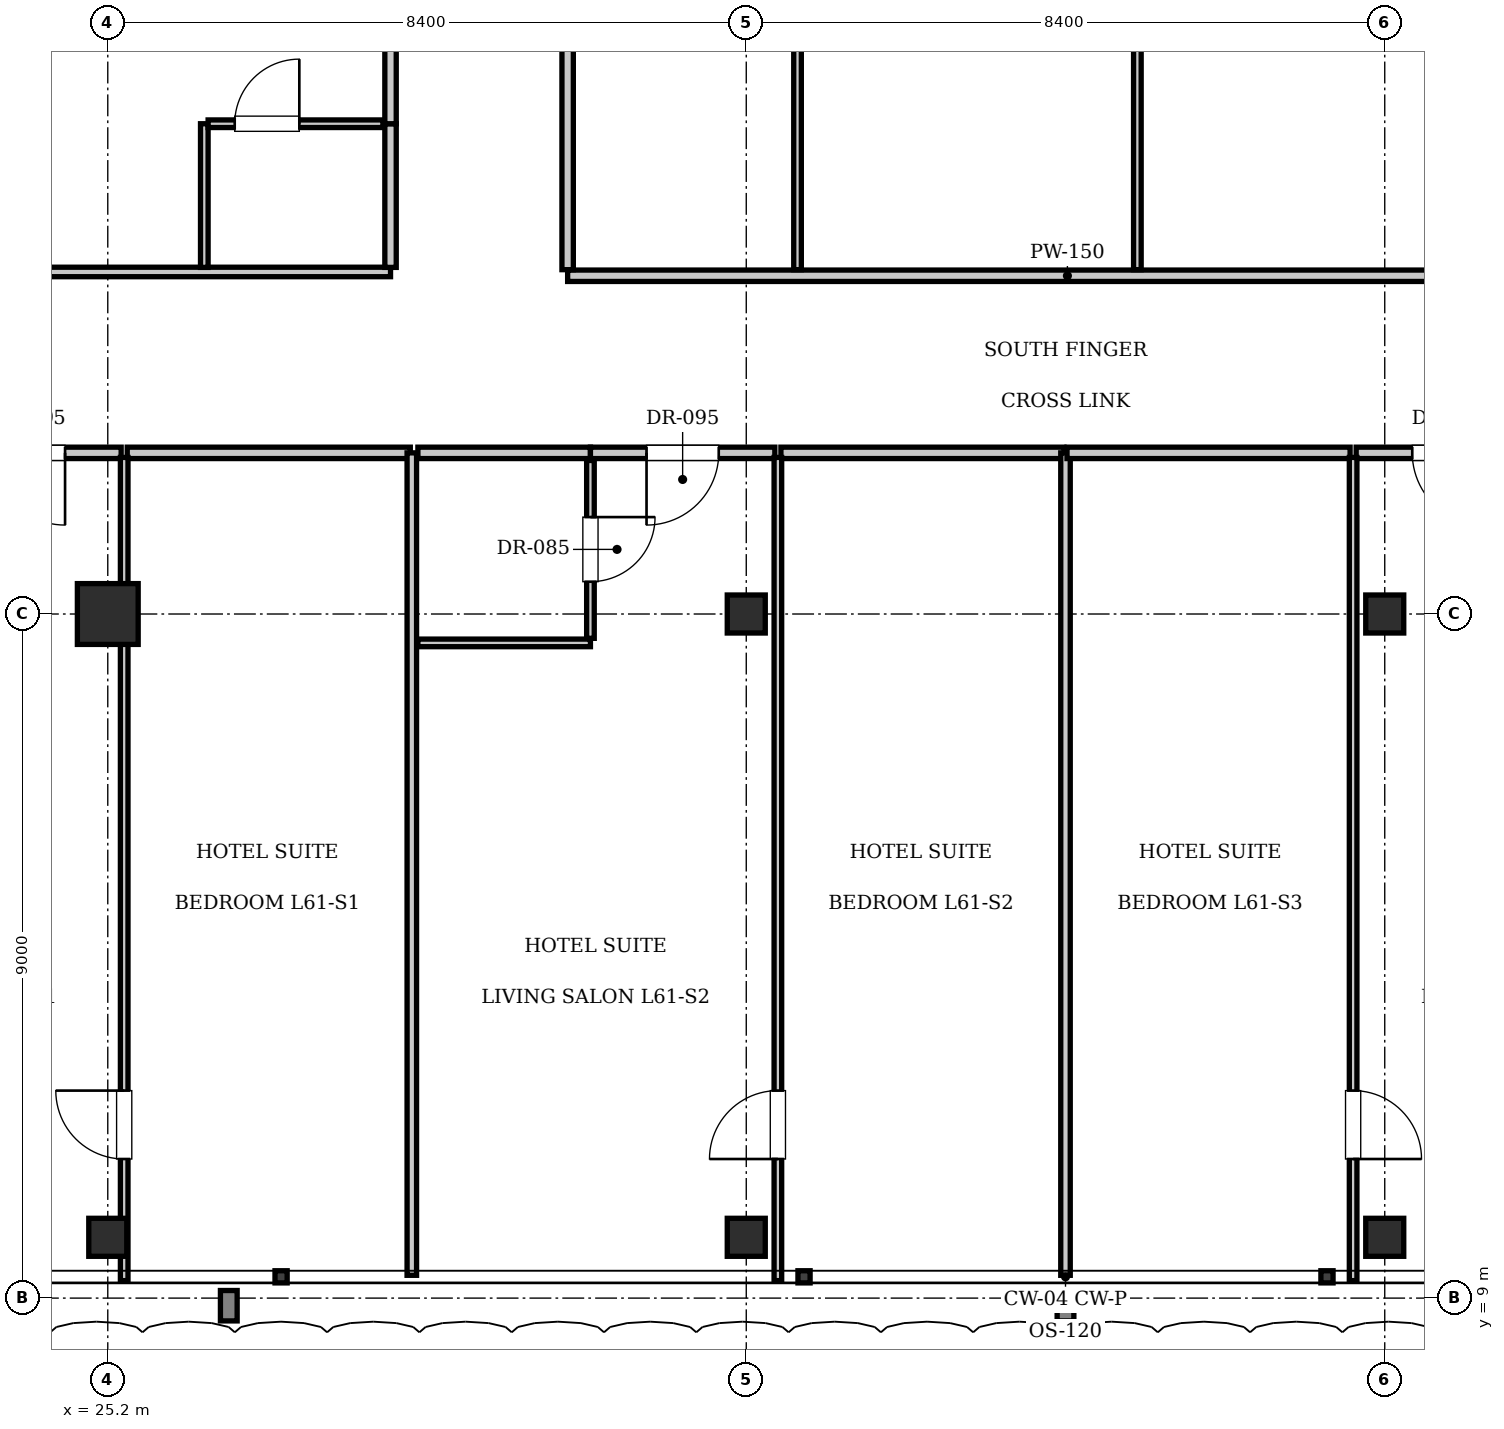
"""IFC4 building model, lengths in metres.
Left out: names, types, materials, properties, quantities, classifications, styles, units other than length and angle.
Written with IfcOpenShell. Run it as: python <this file> out.ifc"""

import sys

from ifc_helpers import new_model, si_unit, direction, frame, frame_2d, origin, origin_2d, place, context, subcontext, project, spatial, rectangle, i_section, extrude, element, fill, save


model = new_model("IFC4")
c1 = context("Model", 3, precision=1e-05, world=origin(), true_north=direction((0.0, 1.0)))
c2 = subcontext(c1, "Body", "Model", "MODEL_VIEW")
j1 = project(units=[si_unit("LENGTHUNIT", "METRE"), si_unit("PLANEANGLEUNIT", "RADIAN")], contexts=[c1])
p1 = place(None, origin())
s1 = spatial("IfcSite", under=j1, at=p1, CompositionType="ELEMENT")
p2 = place(p1, origin())
s2 = spatial("IfcBuilding", under=s1, at=p2, CompositionType="ELEMENT")
p3 = place(p2, frame((0.0, 0.0, 250.95)))
s3 = spatial("IfcBuildingStorey", under=s2, at=p3, CompositionType="ELEMENT", Elevation=250.95)
p4 = place(p3, frame((25.2, 18.0, 0.0), z_axis=(0.0, 0.0, 1.0), x_axis=(1.0, 0.0, 0.0)))
e1 = element("IfcColumn", 1, at=p4, inside=s3, PredefinedType="COLUMN", context=c2, shape_type="SweptSolid", body=[
    extrude(rectangle(XDim=0.8, YDim=0.8, at=origin_2d()), origin(), (0.0, 0.0, 1.0), 3.85),
])
for number, where, z_axis, x_axis in (
    (2, (33.6, 18.0, 0.0), (0.0, 0.0, 1.0), (1.0, 0.0, 0.0)),
    (3, (42.0, 18.0, 0.0), (0.0, 0.0, 1.0), (1.0, 0.0, 0.0)),
    (4, (25.2, 9.8, 0.0), (0.0, 0.0, 1.0), (1.0, 0.0, 0.0)),
    (5, (33.6, 9.8, 0.0), (0.0, 0.0, 1.0), (1.0, 0.0, 0.0)),
    (6, (42.0, 9.8, 0.0), (0.0, 0.0, 1.0), (1.0, 0.0, 0.0)),
):
    element("IfcColumn", number, at=place(p3, frame(where, z_axis=z_axis, x_axis=x_axis)), inside=s3, PredefinedType="COLUMN", context=c2, shape_type="SweptSolid", body=[
        extrude(i_section(OverallWidth=0.5, OverallDepth=0.5, WebThickness=0.022, FlangeThickness=0.032, at=origin_2d()), origin(), (0.0, 0.0, 1.0), 3.85),
    ])
p5 = place(p3, frame((31.25, 22.45, 0.0), z_axis=(0.0, 0.0, 1.0), x_axis=(1.0, 0.0, 0.0)))
e7 = element("IfcWall", 7, at=p5, inside=s3, PredefinedType="PARTITIONING", context=c2, shape_type="SweptSolid", body=[
    extrude(rectangle(XDim=13.15, YDim=0.15, at=frame_2d((6.575, 0.0))), origin(), (0.0, 0.0, 1.0), 3.61),
])
p6 = place(p3, frame((31.25, 22.53, 0.0), z_axis=(0.0, 0.0, 1.0), x_axis=(0.0, 1.0, 0.0)))
e8 = element("IfcWall", 8, at=p6, inside=s3, PredefinedType="PARTITIONING", context=c2, shape_type="SweptSolid", body=[
    extrude(rectangle(XDim=8.89, YDim=0.15, at=frame_2d((4.445, 0.0))), origin(), (0.0, 0.0, 1.0), 3.61),
])
for number, where, z_axis, x_axis in (
    (9, (34.274, 22.53, 0.0), (0.0, 0.0, 1.0), (0.0, 1.0, 0.0)),
    (10, (38.746, 22.53, 0.0), (0.0, 0.0, 1.0), (0.0, 1.0, 0.0)),
):
    element("IfcWall", number, at=place(p3, frame(where, z_axis=z_axis, x_axis=x_axis)), inside=s3, PredefinedType="PARTITIONING", context=c2, shape_type="SweptSolid", body=[
        extrude(rectangle(XDim=8.89, YDim=0.1, at=frame_2d((4.445, 0.0))), origin(), (0.0, 0.0, 1.0), 3.61),
    ])
p7 = place(p3, frame((22.95, 20.12, 0.0), z_axis=(0.0, 0.0, 1.0), x_axis=(1.0, 0.0, 0.0)))
e11 = element("IfcWall", 11, at=p7, inside=s3, PredefinedType="PARTITIONING", context=c2, shape_type="SweptSolid", body=[
    extrude(rectangle(XDim=2.426, YDim=0.15, at=frame_2d((1.213, 0.0))), origin(), (0.0, 0.0, 1.0), 3.61),
])
p8 = place(p7, frame((0.738, 0.0, 0.0)))
e12 = element("IfcOpeningElement", 12, at=p8, cuts=e11, PredefinedType="OPENING", context=c2, shape_type="SweptSolid", body=[
    extrude(rectangle(XDim=0.95, YDim=2.15, at=frame_2d((0.475, 1.075))), frame((0.0, 0.085, 0.0), z_axis=(0.0, -1.0, 0.0), x_axis=(1.0, 0.0, 0.0)), (0.0, 0.0, 1.0), 0.17),
])
p9 = place(p3, frame((25.456, 20.12, 0.0), z_axis=(0.0, 0.0, 1.0), x_axis=(1.0, 0.0, 0.0)))
e13 = element("IfcWall", 13, at=p9, inside=s3, PredefinedType="PARTITIONING", context=c2, shape_type="SweptSolid", body=[
    extrude(rectangle(XDim=3.724, YDim=0.15, at=frame_2d((1.862, 0.0))), origin(), (0.0, 0.0, 1.0), 3.61),
])
p10 = place(p3, frame((25.416, 9.23, 0.0), z_axis=(0.0, 0.0, 1.0), x_axis=(0.0, 1.0, 0.0)))
e14 = element("IfcWall", 14, at=p10, inside=s3, PredefinedType="PARTITIONING", context=c2, shape_type="SweptSolid", body=[
    extrude(rectangle(XDim=10.83, YDim=0.1, at=frame_2d((5.415, 0.0))), origin(), (0.0, 0.0, 1.0), 3.61),
])
p11 = place(p10, frame((1.6, 0.0, 0.0)))
e15 = element("IfcOpeningElement", 15, at=p11, cuts=e14, PredefinedType="OPENING", context=c2, shape_type="SweptSolid", body=[
    extrude(rectangle(XDim=0.9, YDim=2.1, at=frame_2d((0.45, 1.05))), frame((0.0, 0.06, 0.0), z_axis=(0.0, -1.0, 0.0), x_axis=(1.0, 0.0, 0.0)), (0.0, 0.0, 1.0), 0.12),
])
p12 = place(p3, frame((29.2, 9.3, 0.0), z_axis=(0.0, 0.0, 1.0), x_axis=(0.0, 1.0, 0.0)))
e16 = element("IfcWall", 16, at=p12, inside=s3, PredefinedType="PARTITIONING", context=c2, shape_type="SweptSolid", body=[
    extrude(rectangle(XDim=10.82, YDim=0.125, at=frame_2d((5.41, 0.0))), origin(), (0.0, 0.0, 1.0), 3.61),
])
p13 = place(p3, frame((29.28, 20.12, 0.0), z_axis=(0.0, 0.0, 1.0), x_axis=(1.0, 0.0, 0.0)))
e17 = element("IfcWall", 17, at=p13, inside=s3, PredefinedType="PARTITIONING", context=c2, shape_type="SweptSolid", body=[
    extrude(rectangle(XDim=2.27, YDim=0.15, at=frame_2d((1.135, 0.0))), origin(), (0.0, 0.0, 1.0), 3.61),
])
p14 = place(p3, frame((29.28, 17.62, 0.0), z_axis=(0.0, 0.0, 1.0), x_axis=(1.0, 0.0, 0.0)))
e18 = element("IfcWall", 18, at=p14, inside=s3, PredefinedType="PARTITIONING", context=c2, shape_type="SweptSolid", body=[
    extrude(rectangle(XDim=2.27, YDim=0.1, at=frame_2d((1.135, 0.0))), origin(), (0.0, 0.0, 1.0), 3.61),
])
p15 = place(p3, frame((31.55, 17.68, 0.0), z_axis=(0.0, 0.0, 1.0), x_axis=(0.0, 1.0, 0.0)))
e19 = element("IfcWall", 19, at=p15, inside=s3, PredefinedType="PARTITIONING", context=c2, shape_type="SweptSolid", body=[
    extrude(rectangle(XDim=2.34, YDim=0.1, at=frame_2d((1.17, 0.0))), origin(), (0.0, 0.0, 1.0), 3.61),
])
p16 = place(p15, frame((0.745, 0.0, 0.0)))
e20 = element("IfcOpeningElement", 20, at=p16, cuts=e19, PredefinedType="OPENING", context=c2, shape_type="SweptSolid", body=[
    extrude(rectangle(XDim=0.85, YDim=2.1, at=frame_2d((0.425, 1.05))), frame((0.0, 0.06, 0.0), z_axis=(0.0, -1.0, 0.0), x_axis=(1.0, 0.0, 0.0)), (0.0, 0.0, 1.0), 0.12),
])
p17 = place(p3, frame((31.55, 20.12, 0.0), z_axis=(0.0, 0.0, 1.0), x_axis=(1.0, 0.0, 0.0)))
e21 = element("IfcWall", 21, at=p17, inside=s3, PredefinedType="PARTITIONING", context=c2, shape_type="SweptSolid", body=[
    extrude(rectangle(XDim=2.426, YDim=0.15, at=frame_2d((1.213, 0.0))), origin(), (0.0, 0.0, 1.0), 3.61),
])
p18 = place(p17, frame((0.738, 0.0, 0.0)))
e22 = element("IfcOpeningElement", 22, at=p18, cuts=e21, PredefinedType="OPENING", context=c2, shape_type="SweptSolid", body=[
    extrude(rectangle(XDim=0.95, YDim=2.15, at=frame_2d((0.475, 1.075))), frame((0.0, 0.085, 0.0), z_axis=(0.0, -1.0, 0.0), x_axis=(1.0, 0.0, 0.0)), (0.0, 0.0, 1.0), 0.17),
])
p19 = place(p3, frame((34.056, 20.12, 0.0), z_axis=(0.0, 0.0, 1.0), x_axis=(1.0, 0.0, 0.0)))
e23 = element("IfcWall", 23, at=p19, inside=s3, PredefinedType="PARTITIONING", context=c2, shape_type="SweptSolid", body=[
    extrude(rectangle(XDim=3.724, YDim=0.15, at=frame_2d((1.862, 0.0))), origin(), (0.0, 0.0, 1.0), 3.61),
])
p20 = place(p3, frame((34.016, 9.23, 0.0), z_axis=(0.0, 0.0, 1.0), x_axis=(0.0, 1.0, 0.0)))
e24 = element("IfcWall", 24, at=p20, inside=s3, PredefinedType="PARTITIONING", context=c2, shape_type="SweptSolid", body=[
    extrude(rectangle(XDim=10.83, YDim=0.1, at=frame_2d((5.415, 0.0))), origin(), (0.0, 0.0, 1.0), 3.61),
])
p21 = place(p20, frame((1.6, 0.0, 0.0)))
e25 = element("IfcOpeningElement", 25, at=p21, cuts=e24, PredefinedType="OPENING", context=c2, shape_type="SweptSolid", body=[
    extrude(rectangle(XDim=0.9, YDim=2.1, at=frame_2d((0.45, 1.05))), frame((0.0, 0.06, 0.0), z_axis=(0.0, -1.0, 0.0), x_axis=(1.0, 0.0, 0.0)), (0.0, 0.0, 1.0), 0.12),
])
p22 = place(p3, frame((37.8, 9.3, 0.0), z_axis=(0.0, 0.0, 1.0), x_axis=(0.0, 1.0, 0.0)))
e26 = element("IfcWall", 26, at=p22, inside=s3, PredefinedType="PARTITIONING", context=c2, shape_type="SweptSolid", body=[
    extrude(rectangle(XDim=10.82, YDim=0.125, at=frame_2d((5.41, 0.0))), origin(), (0.0, 0.0, 1.0), 3.352),
])
p23 = place(p3, frame((37.82, 20.12, 0.0), z_axis=(0.0, 0.0, 1.0), x_axis=(1.0, 0.0, 0.0)))
e27 = element("IfcWall", 27, at=p23, inside=s3, PredefinedType="PARTITIONING", context=c2, shape_type="SweptSolid", body=[
    extrude(rectangle(XDim=3.724, YDim=0.15, at=frame_2d((1.862, 0.0))), origin(), (0.0, 0.0, 1.0), 3.61),
])
p24 = place(p3, frame((41.624, 20.12, 0.0), z_axis=(0.0, 0.0, 1.0), x_axis=(1.0, 0.0, 0.0)))
e28 = element("IfcWall", 28, at=p24, inside=s3, PredefinedType="PARTITIONING", context=c2, shape_type="SweptSolid", body=[
    extrude(rectangle(XDim=2.426, YDim=0.15, at=frame_2d((1.213, 0.0))), origin(), (0.0, 0.0, 1.0), 3.61),
])
p25 = place(p24, frame((0.738, 0.0, 0.0)))
e29 = element("IfcOpeningElement", 29, at=p25, cuts=e28, PredefinedType="OPENING", context=c2, shape_type="SweptSolid", body=[
    extrude(rectangle(XDim=0.95, YDim=2.15, at=frame_2d((0.475, 1.075))), frame((0.0, 0.085, 0.0), z_axis=(0.0, -1.0, 0.0), x_axis=(1.0, 0.0, 0.0)), (0.0, 0.0, 1.0), 0.17),
])
p26 = place(p3, frame((41.584, 9.23, 0.0), z_axis=(0.0, 0.0, 1.0), x_axis=(0.0, 1.0, 0.0)))
e30 = element("IfcWall", 30, at=p26, inside=s3, PredefinedType="PARTITIONING", context=c2, shape_type="SweptSolid", body=[
    extrude(rectangle(XDim=10.83, YDim=0.1, at=frame_2d((5.415, 0.0))), origin(), (0.0, 0.0, 1.0), 3.61),
])
p27 = place(p26, frame((1.6, 0.0, 0.0)))
e31 = element("IfcOpeningElement", 31, at=p27, cuts=e30, PredefinedType="OPENING", context=c2, shape_type="SweptSolid", body=[
    extrude(rectangle(XDim=0.9, YDim=2.1, at=frame_2d((0.45, 1.05))), frame((0.0, 0.06, 0.0), z_axis=(0.0, -1.0, 0.0), x_axis=(1.0, 0.0, 0.0)), (0.0, 0.0, 1.0), 0.12),
])
p28 = place(p3, frame((15.5, 22.5, 0.0), z_axis=(0.0, 0.0, 1.0), x_axis=(1.0, 0.0, 0.0)))
e32 = element("IfcWall", 32, at=p28, inside=s3, PredefinedType="PARTITIONING", context=c2, shape_type="SweptSolid", body=[
    extrude(rectangle(XDim=13.42, YDim=0.125, at=frame_2d((6.71, 0.0))), origin(), (0.0, 0.0, 1.0), 3.61),
])
p29 = place(p3, frame((28.92, 22.56, 0.0), z_axis=(0.0, 0.0, 1.0), x_axis=(0.0, 1.0, 0.0)))
e33 = element("IfcWall", 33, at=p29, inside=s3, PredefinedType="PARTITIONING", context=c2, shape_type="SweptSolid", body=[
    extrude(rectangle(XDim=1.89, YDim=0.15, at=frame_2d((0.945, 0.0))), origin(), (0.0, 0.0, 1.0), 3.61),
])
p30 = place(p3, frame((28.92, 24.45, 0.0), z_axis=(0.0, 0.0, 1.0), x_axis=(0.0, 1.0, 0.0)))
e34 = element("IfcWall", 34, at=p30, inside=s3, PredefinedType="PARTITIONING", context=c2, shape_type="SweptSolid", body=[
    extrude(rectangle(XDim=2.93, YDim=0.15, at=frame_2d((1.465, 0.0))), origin(), (0.0, 0.0, 1.0), 3.61),
])
p31 = place(p30, frame((0.99, 0.0, 0.0)))
e35 = element("IfcOpeningElement", 35, at=p31, cuts=e34, PredefinedType="OPENING", context=c2, shape_type="SweptSolid", body=[
    extrude(rectangle(XDim=0.95, YDim=2.15, at=frame_2d((0.475, 1.075))), frame((0.0, 0.085, 0.0), z_axis=(0.0, -1.0, 0.0), x_axis=(1.0, 0.0, 0.0)), (0.0, 0.0, 1.0), 0.17),
])
p32 = place(p3, frame((26.47, 22.56, 0.0), z_axis=(0.0, 0.0, 1.0), x_axis=(0.0, 1.0, 0.0)))
e36 = element("IfcWall", 36, at=p32, inside=s3, PredefinedType="PARTITIONING", context=c2, shape_type="SweptSolid", body=[
    extrude(rectangle(XDim=1.89, YDim=0.1, at=frame_2d((0.945, 0.0))), origin(), (0.0, 0.0, 1.0), 3.61),
])
p33 = place(p3, frame((26.52, 24.45, 0.0), z_axis=(0.0, 0.0, 1.0), x_axis=(1.0, 0.0, 0.0)))
e37 = element("IfcWall", 37, at=p33, inside=s3, PredefinedType="PARTITIONING", context=c2, shape_type="SweptSolid", body=[
    extrude(rectangle(XDim=2.3, YDim=0.1, at=frame_2d((1.15, 0.0))), origin(), (0.0, 0.0, 1.0), 3.61),
])
p34 = place(p33, frame((0.35, 0.0, 0.0)))
e38 = element("IfcOpeningElement", 38, at=p34, cuts=e37, PredefinedType="OPENING", context=c2, shape_type="SweptSolid", body=[
    extrude(rectangle(XDim=0.85, YDim=2.1, at=frame_2d((0.425, 1.05))), frame((0.0, 0.06, 0.0), z_axis=(0.0, -1.0, 0.0), x_axis=(1.0, 0.0, 0.0)), (0.0, 0.0, 1.0), 0.12),
])
p35 = place(p8, frame((0.95, 0.0, 0.0), z_axis=(0.0, 0.0, 1.0), x_axis=(-1.0, 0.0, 0.0)))
e39 = element("IfcDoor", 39, at=p35, inside=s3, OperationType="SINGLE_SWING_LEFT", PredefinedType="DOOR", context=c2, shape_type="SweptSolid", body=[
    extrude(rectangle(XDim=0.95, YDim=2.15, at=frame_2d((0.475, 1.075))), frame((0.0, 0.025, 0.0), z_axis=(0.0, -1.0, 0.0), x_axis=(1.0, 0.0, 0.0)), (0.0, 0.0, 1.0), 0.05),
])
fill(e12, e39)
p36 = place(p11, origin())
e40 = element("IfcDoor", 40, at=p36, inside=s3, OperationType="SINGLE_SWING_RIGHT", PredefinedType="DOOR", context=c2, shape_type="SweptSolid", body=[
    extrude(rectangle(XDim=0.9, YDim=2.1, at=frame_2d((0.45, 1.05))), frame((0.0, 0.025, 0.0), z_axis=(0.0, -1.0, 0.0), x_axis=(1.0, 0.0, 0.0)), (0.0, 0.0, 1.0), 0.05),
])
fill(e15, e40)
p37 = place(p16, frame((0.85, 0.0, 0.0), z_axis=(0.0, 0.0, 1.0), x_axis=(-1.0, 0.0, 0.0)))
e41 = element("IfcDoor", 41, at=p37, inside=s3, OperationType="SINGLE_SWING_LEFT", PredefinedType="DOOR", context=c2, shape_type="SweptSolid", body=[
    extrude(rectangle(XDim=0.85, YDim=2.1, at=frame_2d((0.425, 1.05))), frame((0.0, 0.025, 0.0), z_axis=(0.0, -1.0, 0.0), x_axis=(1.0, 0.0, 0.0)), (0.0, 0.0, 1.0), 0.05),
])
fill(e20, e41)
p38 = place(p18, frame((0.95, 0.0, 0.0), z_axis=(0.0, 0.0, 1.0), x_axis=(-1.0, 0.0, 0.0)))
e42 = element("IfcDoor", 42, at=p38, inside=s3, OperationType="SINGLE_SWING_RIGHT", PredefinedType="DOOR", context=c2, shape_type="SweptSolid", body=[
    extrude(rectangle(XDim=0.95, YDim=2.15, at=frame_2d((0.475, 1.075))), frame((0.0, 0.025, 0.0), z_axis=(0.0, -1.0, 0.0), x_axis=(1.0, 0.0, 0.0)), (0.0, 0.0, 1.0), 0.05),
])
fill(e22, e42)
p39 = place(p21, origin())
e43 = element("IfcDoor", 43, at=p39, inside=s3, OperationType="SINGLE_SWING_LEFT", PredefinedType="DOOR", context=c2, shape_type="SweptSolid", body=[
    extrude(rectangle(XDim=0.9, YDim=2.1, at=frame_2d((0.45, 1.05))), frame((0.0, 0.025, 0.0), z_axis=(0.0, -1.0, 0.0), x_axis=(1.0, 0.0, 0.0)), (0.0, 0.0, 1.0), 0.05),
])
fill(e25, e43)
p40 = place(p25, frame((0.95, 0.0, 0.0), z_axis=(0.0, 0.0, 1.0), x_axis=(-1.0, 0.0, 0.0)))
e44 = element("IfcDoor", 44, at=p40, inside=s3, OperationType="SINGLE_SWING_LEFT", PredefinedType="DOOR", context=c2, shape_type="SweptSolid", body=[
    extrude(rectangle(XDim=0.95, YDim=2.15, at=frame_2d((0.475, 1.075))), frame((0.0, 0.025, 0.0), z_axis=(0.0, -1.0, 0.0), x_axis=(1.0, 0.0, 0.0)), (0.0, 0.0, 1.0), 0.05),
])
fill(e29, e44)
p41 = place(p27, frame((0.9, 0.0, 0.0), z_axis=(0.0, 0.0, 1.0), x_axis=(-1.0, 0.0, 0.0)))
e45 = element("IfcDoor", 45, at=p41, inside=s3, OperationType="SINGLE_SWING_RIGHT", PredefinedType="DOOR", context=c2, shape_type="SweptSolid", body=[
    extrude(rectangle(XDim=0.9, YDim=2.1, at=frame_2d((0.45, 1.05))), frame((0.0, 0.025, 0.0), z_axis=(0.0, -1.0, 0.0), x_axis=(1.0, 0.0, 0.0)), (0.0, 0.0, 1.0), 0.05),
])
fill(e31, e45)
p42 = place(p34, origin())
e46 = element("IfcDoor", 46, at=p42, inside=s3, OperationType="SINGLE_SWING_RIGHT", PredefinedType="DOOR", context=c2, shape_type="SweptSolid", body=[
    extrude(rectangle(XDim=0.85, YDim=2.1, at=frame_2d((0.425, 1.05))), frame((0.0, 0.025, 0.0), z_axis=(0.0, -1.0, 0.0), x_axis=(1.0, 0.0, 0.0)), (0.0, 0.0, 1.0), 0.05),
])
fill(e38, e46)
save(model, sys.argv[1])
